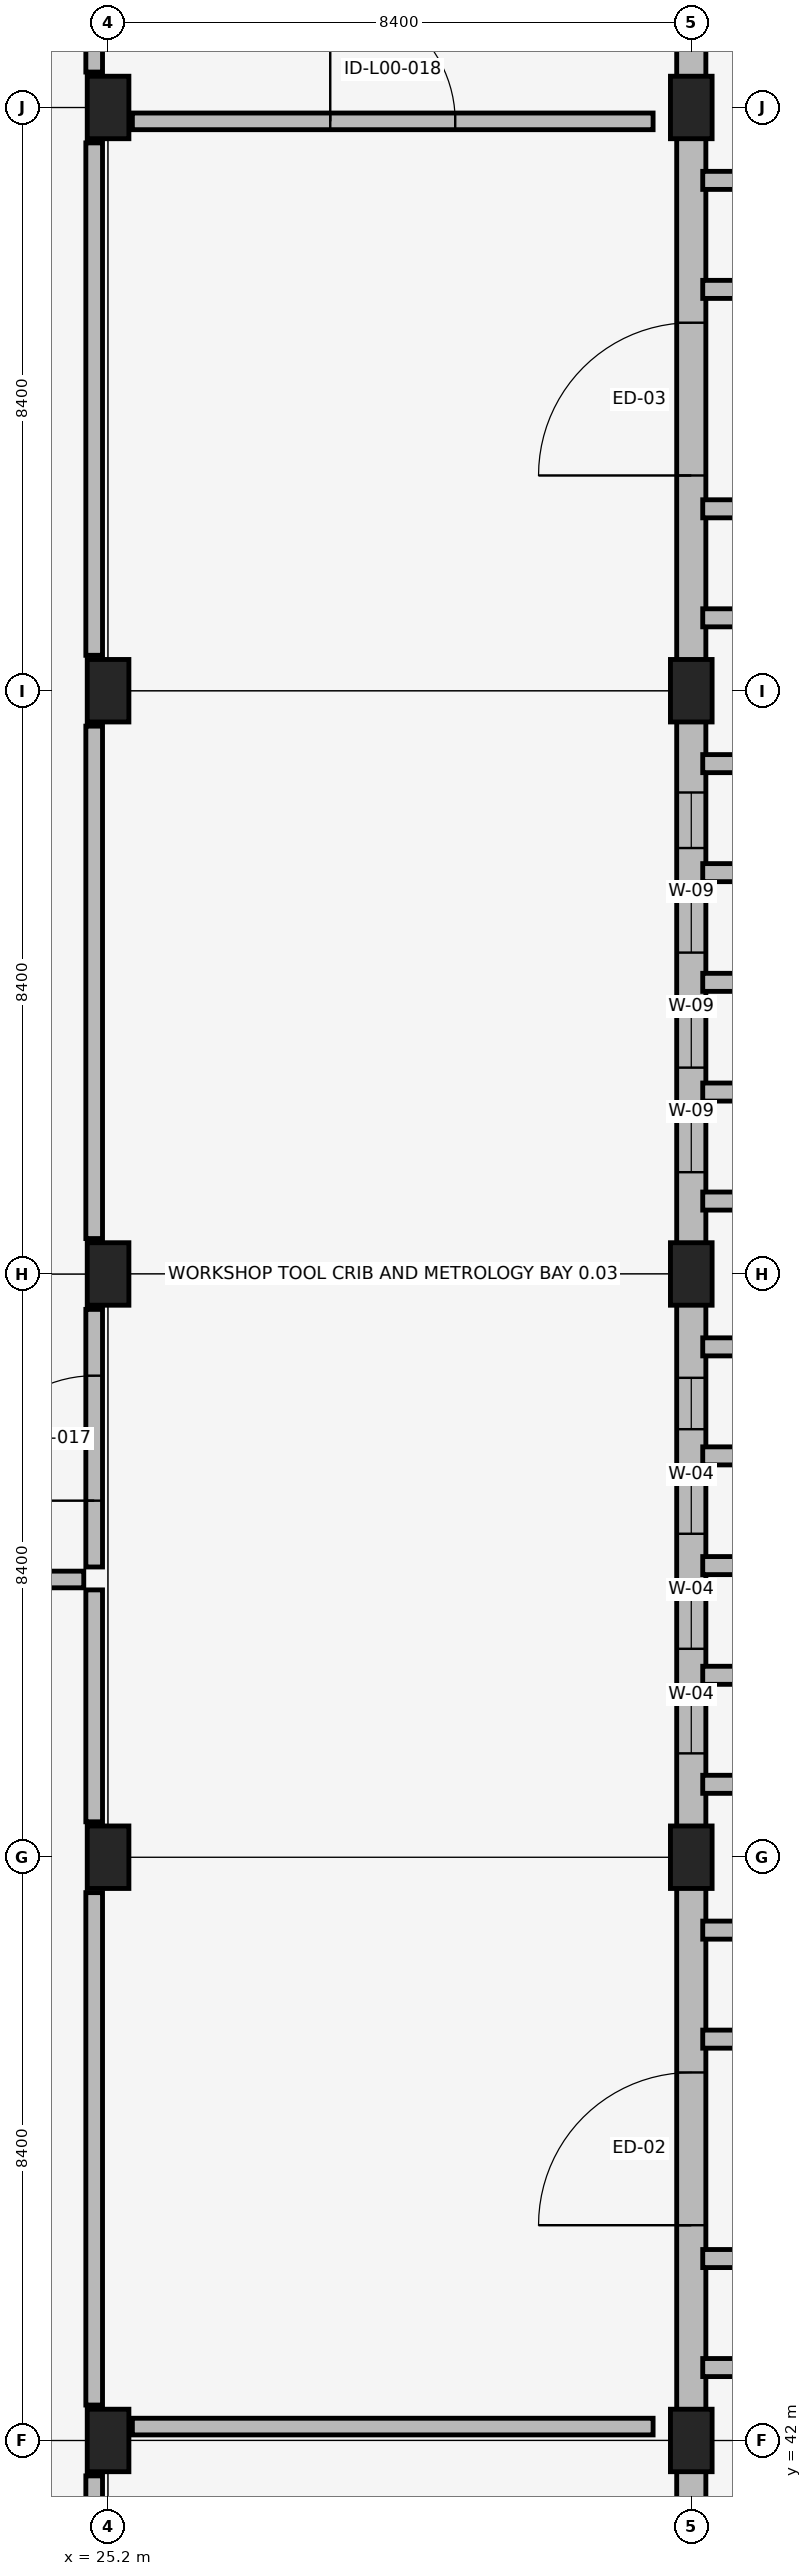
"""IFC4 building model, lengths in metres.
Left out: names, types, materials, properties, quantities, classifications, styles, units other than length and angle.
Written with IfcOpenShell. Run it as: python <this file> out.ifc"""

import sys

from ifc_helpers import new_model, si_unit, direction, frame, frame_2d, origin, origin_2d, place, context, subcontext, project, spatial, rectangle, extrude, element, fill, save


model = new_model("IFC4")
c1 = context("Model", 3, precision=1e-05, world=origin(), true_north=direction((0.0, 1.0)))
c2 = subcontext(c1, "Body", "Model", "MODEL_VIEW")
j1 = project(units=[si_unit("LENGTHUNIT", "METRE"), si_unit("PLANEANGLEUNIT", "RADIAN")], contexts=[c1])
p1 = place(None, origin())
s1 = spatial("IfcSite", under=j1, at=p1, CompositionType="ELEMENT")
p2 = place(p1, origin())
s2 = spatial("IfcBuilding", under=s1, at=p2, CompositionType="ELEMENT")
p3 = place(p2, origin())
s3 = spatial("IfcBuildingStorey", under=s2, at=p3, CompositionType="ELEMENT", Elevation=0.0)
for number, where, z_axis, x_axis in (
    (1, (25.2, 42.0, 0.0), (0.0, 0.0, 1.0), (1.0, 0.0, 0.0)),
    (2, (25.2, 50.4, 0.0), (0.0, 0.0, 1.0), (1.0, 0.0, 0.0)),
    (3, (25.2, 58.8, 0.0), (0.0, 0.0, 1.0), (1.0, 0.0, 0.0)),
    (4, (25.2, 67.2, 0.0), (0.0, 0.0, 1.0), (1.0, 0.0, 0.0)),
    (5, (25.2, 75.6, 0.0), (0.0, 0.0, 1.0), (1.0, 0.0, 0.0)),
    (6, (33.6, 42.0, 0.0), (0.0, 0.0, 1.0), (1.0, 0.0, 0.0)),
    (7, (33.6, 50.4, 0.0), (0.0, 0.0, 1.0), (1.0, 0.0, 0.0)),
    (8, (33.6, 58.8, 0.0), (0.0, 0.0, 1.0), (1.0, 0.0, 0.0)),
    (9, (33.6, 67.2, 0.0), (0.0, 0.0, 1.0), (1.0, 0.0, 0.0)),
    (10, (33.6, 75.6, 0.0), (0.0, 0.0, 1.0), (1.0, 0.0, 0.0)),
):
    element("IfcColumn", number, at=place(p3, frame(where, z_axis=z_axis, x_axis=x_axis)), inside=s3, PredefinedType="COLUMN", context=c2, shape_type="SweptSolid", body=[
        extrude(rectangle(XDim=0.6, YDim=0.9, at=origin_2d()), origin(), (0.0, 0.0, 1.0), 5.14),
    ])
p4 = place(p3, frame((33.6, 34.035, 0.0), z_axis=(0.0, 0.0, 1.0), x_axis=(0.0, 1.0, 0.0)))
e11 = element("IfcWall", 11, at=p4, inside=s3, PredefinedType="SOLIDWALL", context=c2, shape_type="SweptSolid", body=[
    extrude(rectangle(XDim=7.53, YDim=0.42, at=frame_2d((3.765, 0.0))), origin(), (0.0, 0.0, 1.0), 4.35),
])
p5 = place(p3, frame((33.6, 42.435, 0.0), z_axis=(0.0, 0.0, 1.0), x_axis=(0.0, 1.0, 0.0)))
e12 = element("IfcWall", 12, at=p5, inside=s3, PredefinedType="SOLIDWALL", context=c2, shape_type="SweptSolid", body=[
    extrude(rectangle(XDim=7.53, YDim=0.42, at=frame_2d((3.765, 0.0))), origin(), (0.0, 0.0, 1.0), 4.35),
])
p6 = place(p5, frame((2.665, 0.0, 0.0)))
e13 = element("IfcOpeningElement", 13, at=p6, cuts=e12, PredefinedType="OPENING", context=c2, shape_type="SweptSolid", body=[
    extrude(rectangle(XDim=2.2, YDim=2.4, at=frame_2d((1.1, 1.2))), frame((0.0, 0.22, 0.0), z_axis=(0.0, -1.0, 0.0), x_axis=(1.0, 0.0, 0.0)), (0.0, 0.0, 1.0), 0.44),
])
for number, where, z_axis, x_axis in (
    (14, (33.765, 43.05, -0.25), (0.0, 0.0, 1.0), (1.0, 0.0, 0.0)),
    (15, (33.765, 44.62, -0.25), (0.0, 0.0, 1.0), (1.0, 0.0, 0.0)),
    (16, (33.765, 47.78, -0.25), (0.0, 0.0, 1.0), (1.0, 0.0, 0.0)),
    (17, (33.765, 49.35, -0.25), (0.0, 0.0, 1.0), (1.0, 0.0, 0.0)),
):
    element("IfcWall", number, at=place(p3, frame(where, z_axis=z_axis, x_axis=x_axis)), inside=s3, PredefinedType="SOLIDWALL", context=c2, shape_type="SweptSolid", body=[
        extrude(rectangle(XDim=0.7, YDim=0.26, at=frame_2d((0.35, 0.0))), origin(), (0.0, 0.0, 1.0), 5.69),
    ])
p7 = place(p3, frame((33.6, 50.835, 0.0), z_axis=(0.0, 0.0, 1.0), x_axis=(0.0, 1.0, 0.0)))
e18 = element("IfcWall", 18, at=p7, inside=s3, PredefinedType="SOLIDWALL", context=c2, shape_type="SweptSolid", body=[
    extrude(rectangle(XDim=7.53, YDim=0.42, at=frame_2d((3.765, 0.0))), origin(), (0.0, 0.0, 1.0), 4.35),
])
p8 = place(p7, frame((1.061, 0.0, 0.75)))
e19 = element("IfcOpeningElement", 19, at=p8, cuts=e18, PredefinedType="OPENING", context=c2, shape_type="SweptSolid", body=[
    extrude(rectangle(XDim=0.74, YDim=2.3, at=frame_2d((0.37, 1.15))), frame((0.0, 0.22, 0.0), z_axis=(0.0, -1.0, 0.0), x_axis=(1.0, 0.0, 0.0)), (0.0, 0.0, 1.0), 0.44),
])
p9 = place(p7, frame((2.567, 0.0, 0.75)))
e20 = element("IfcOpeningElement", 20, at=p9, cuts=e18, PredefinedType="OPENING", context=c2, shape_type="SweptSolid", body=[
    extrude(rectangle(XDim=0.74, YDim=2.3, at=frame_2d((0.37, 1.15))), frame((0.0, 0.22, 0.0), z_axis=(0.0, -1.0, 0.0), x_axis=(1.0, 0.0, 0.0)), (0.0, 0.0, 1.0), 0.44),
])
p10 = place(p7, frame((4.223, 0.0, 0.75)))
e21 = element("IfcOpeningElement", 21, at=p10, cuts=e18, PredefinedType="OPENING", context=c2, shape_type="SweptSolid", body=[
    extrude(rectangle(XDim=0.74, YDim=2.3, at=frame_2d((0.37, 1.15))), frame((0.0, 0.22, 0.0), z_axis=(0.0, -1.0, 0.0), x_axis=(1.0, 0.0, 0.0)), (0.0, 0.0, 1.0), 0.44),
])
p11 = place(p7, frame((5.729, 0.0, 0.75)))
e22 = element("IfcOpeningElement", 22, at=p11, cuts=e18, PredefinedType="OPENING", context=c2, shape_type="SweptSolid", body=[
    extrude(rectangle(XDim=0.74, YDim=2.3, at=frame_2d((0.37, 1.15))), frame((0.0, 0.22, 0.0), z_axis=(0.0, -1.0, 0.0), x_axis=(1.0, 0.0, 0.0)), (0.0, 0.0, 1.0), 0.44),
])
for number, where, z_axis, x_axis in (
    (23, (33.765, 51.45, -0.25), (0.0, 0.0, 1.0), (1.0, 0.0, 0.0)),
    (24, (33.765, 53.02, -0.25), (0.0, 0.0, 1.0), (1.0, 0.0, 0.0)),
    (25, (33.765, 54.6, -0.25), (0.0, 0.0, 1.0), (1.0, 0.0, 0.0)),
    (26, (33.765, 56.18, -0.25), (0.0, 0.0, 1.0), (1.0, 0.0, 0.0)),
    (27, (33.765, 57.75, -0.25), (0.0, 0.0, 1.0), (1.0, 0.0, 0.0)),
):
    element("IfcWall", number, at=place(p3, frame(where, z_axis=z_axis, x_axis=x_axis)), inside=s3, PredefinedType="SOLIDWALL", context=c2, shape_type="SweptSolid", body=[
        extrude(rectangle(XDim=0.7, YDim=0.26, at=frame_2d((0.35, 0.0))), origin(), (0.0, 0.0, 1.0), 5.69),
    ])
p12 = place(p3, frame((33.6, 59.235, 0.0), z_axis=(0.0, 0.0, 1.0), x_axis=(0.0, 1.0, 0.0)))
e28 = element("IfcWall", 28, at=p12, inside=s3, PredefinedType="SOLIDWALL", context=c2, shape_type="SweptSolid", body=[
    extrude(rectangle(XDim=7.53, YDim=0.42, at=frame_2d((3.765, 0.0))), origin(), (0.0, 0.0, 1.0), 4.35),
])
p13 = place(p12, frame((1.031, 0.0, 0.75)))
e29 = element("IfcOpeningElement", 29, at=p13, cuts=e28, PredefinedType="OPENING", context=c2, shape_type="SweptSolid", body=[
    extrude(rectangle(XDim=0.8, YDim=2.75, at=frame_2d((0.4, 1.375))), frame((0.0, 0.22, 0.0), z_axis=(0.0, -1.0, 0.0), x_axis=(1.0, 0.0, 0.0)), (0.0, 0.0, 1.0), 0.44),
])
p14 = place(p12, frame((2.537, 0.0, 0.75)))
e30 = element("IfcOpeningElement", 30, at=p14, cuts=e28, PredefinedType="OPENING", context=c2, shape_type="SweptSolid", body=[
    extrude(rectangle(XDim=0.8, YDim=2.75, at=frame_2d((0.4, 1.375))), frame((0.0, 0.22, 0.0), z_axis=(0.0, -1.0, 0.0), x_axis=(1.0, 0.0, 0.0)), (0.0, 0.0, 1.0), 0.44),
])
p15 = place(p12, frame((4.193, 0.0, 0.75)))
e31 = element("IfcOpeningElement", 31, at=p15, cuts=e28, PredefinedType="OPENING", context=c2, shape_type="SweptSolid", body=[
    extrude(rectangle(XDim=0.8, YDim=2.75, at=frame_2d((0.4, 1.375))), frame((0.0, 0.22, 0.0), z_axis=(0.0, -1.0, 0.0), x_axis=(1.0, 0.0, 0.0)), (0.0, 0.0, 1.0), 0.44),
])
p16 = place(p12, frame((5.699, 0.0, 0.75)))
e32 = element("IfcOpeningElement", 32, at=p16, cuts=e28, PredefinedType="OPENING", context=c2, shape_type="SweptSolid", body=[
    extrude(rectangle(XDim=0.8, YDim=2.75, at=frame_2d((0.4, 1.375))), frame((0.0, 0.22, 0.0), z_axis=(0.0, -1.0, 0.0), x_axis=(1.0, 0.0, 0.0)), (0.0, 0.0, 1.0), 0.44),
])
for number, where, z_axis, x_axis in (
    (33, (33.765, 59.85, -0.25), (0.0, 0.0, 1.0), (1.0, 0.0, 0.0)),
    (34, (33.765, 61.42, -0.25), (0.0, 0.0, 1.0), (1.0, 0.0, 0.0)),
    (35, (33.765, 63.0, -0.25), (0.0, 0.0, 1.0), (1.0, 0.0, 0.0)),
    (36, (33.765, 64.58, -0.25), (0.0, 0.0, 1.0), (1.0, 0.0, 0.0)),
    (37, (33.765, 66.15, -0.25), (0.0, 0.0, 1.0), (1.0, 0.0, 0.0)),
):
    element("IfcWall", number, at=place(p3, frame(where, z_axis=z_axis, x_axis=x_axis)), inside=s3, PredefinedType="SOLIDWALL", context=c2, shape_type="SweptSolid", body=[
        extrude(rectangle(XDim=0.7, YDim=0.26, at=frame_2d((0.35, 0.0))), origin(), (0.0, 0.0, 1.0), 5.69),
    ])
p17 = place(p3, frame((33.6, 67.635, 0.0), z_axis=(0.0, 0.0, 1.0), x_axis=(0.0, 1.0, 0.0)))
e38 = element("IfcWall", 38, at=p17, inside=s3, PredefinedType="SOLIDWALL", context=c2, shape_type="SweptSolid", body=[
    extrude(rectangle(XDim=7.53, YDim=0.42, at=frame_2d((3.765, 0.0))), origin(), (0.0, 0.0, 1.0), 4.35),
])
p18 = place(p17, frame((2.665, 0.0, 0.0)))
e39 = element("IfcOpeningElement", 39, at=p18, cuts=e38, PredefinedType="OPENING", context=c2, shape_type="SweptSolid", body=[
    extrude(rectangle(XDim=2.2, YDim=2.4, at=frame_2d((1.1, 1.2))), frame((0.0, 0.22, 0.0), z_axis=(0.0, -1.0, 0.0), x_axis=(1.0, 0.0, 0.0)), (0.0, 0.0, 1.0), 0.44),
])
for number, where, z_axis, x_axis in (
    (40, (33.765, 68.25, -0.25), (0.0, 0.0, 1.0), (1.0, 0.0, 0.0)),
    (41, (33.765, 69.82, -0.25), (0.0, 0.0, 1.0), (1.0, 0.0, 0.0)),
    (42, (33.765, 72.98, -0.25), (0.0, 0.0, 1.0), (1.0, 0.0, 0.0)),
    (43, (33.765, 74.55, -0.25), (0.0, 0.0, 1.0), (1.0, 0.0, 0.0)),
):
    element("IfcWall", number, at=place(p3, frame(where, z_axis=z_axis, x_axis=x_axis)), inside=s3, PredefinedType="SOLIDWALL", context=c2, shape_type="SweptSolid", body=[
        extrude(rectangle(XDim=0.7, YDim=0.26, at=frame_2d((0.35, 0.0))), origin(), (0.0, 0.0, 1.0), 5.69),
    ])
p19 = place(p3, frame((33.6, 76.035, 0.0), z_axis=(0.0, 0.0, 1.0), x_axis=(0.0, 1.0, 0.0)))
e44 = element("IfcWall", 44, at=p19, inside=s3, PredefinedType="SOLIDWALL", context=c2, shape_type="SweptSolid", body=[
    extrude(rectangle(XDim=7.53, YDim=0.42, at=frame_2d((3.765, 0.0))), origin(), (0.0, 0.0, 1.0), 4.35),
])
p20 = place(p3, frame((0.55, 54.4, 0.0), z_axis=(0.0, 0.0, 1.0), x_axis=(1.0, 0.0, 0.0)))
e45 = element("IfcWall", 45, at=p20, inside=s3, PredefinedType="PARTITIONING", context=c2, shape_type="SweptSolid", body=[
    extrude(rectangle(XDim=24.3, YDim=0.24, at=frame_2d((12.15, 0.0))), origin(), (0.0, 0.0, 1.0), 5.14),
])
for number, where, z_axis, x_axis in (
    (46, (25.0, 34.11, 0.0), (0.0, 0.0, 1.0), (0.0, 1.0, 0.0)),
    (47, (25.0, 42.51, 0.0), (0.0, 0.0, 1.0), (0.0, 1.0, 0.0)),
):
    element("IfcWall", number, at=place(p3, frame(where, z_axis=z_axis, x_axis=x_axis)), inside=s3, PredefinedType="PARTITIONING", context=c2, shape_type="SweptSolid", body=[
        extrude(rectangle(XDim=7.38, YDim=0.24, at=frame_2d((3.69, 0.0))), origin(), (0.0, 0.0, 1.0), 4.35),
    ])
p21 = place(p3, frame((25.0, 50.91, 0.0), z_axis=(0.0, 0.0, 1.0), x_axis=(0.0, 1.0, 0.0)))
e48 = element("IfcWall", 48, at=p21, inside=s3, PredefinedType="PARTITIONING", context=c2, shape_type="SweptSolid", body=[
    extrude(rectangle(XDim=3.34, YDim=0.24, at=frame_2d((1.67, 0.0))), origin(), (0.0, 0.0, 1.0), 4.35),
])
p22 = place(p3, frame((25.0, 54.58, 0.0), z_axis=(0.0, 0.0, 1.0), x_axis=(0.0, 1.0, 0.0)))
e49 = element("IfcWall", 49, at=p22, inside=s3, PredefinedType="PARTITIONING", context=c2, shape_type="SweptSolid", body=[
    extrude(rectangle(XDim=3.71, YDim=0.24, at=frame_2d((1.855, 0.0))), origin(), (0.0, 0.0, 1.0), 4.35),
])
p23 = place(p22, frame((0.955, 0.0, 0.0)))
e50 = element("IfcOpeningElement", 50, at=p23, cuts=e49, PredefinedType="OPENING", context=c2, shape_type="SweptSolid", body=[
    extrude(rectangle(XDim=1.8, YDim=2.4, at=frame_2d((0.9, 1.2))), frame((0.0, 0.13, 0.0), z_axis=(0.0, -1.0, 0.0), x_axis=(1.0, 0.0, 0.0)), (0.0, 0.0, 1.0), 0.26),
])
p24 = place(p3, frame((25.0, 59.31, 0.0), z_axis=(0.0, 0.0, 1.0), x_axis=(0.0, 1.0, 0.0)))
e51 = element("IfcWall", 51, at=p24, inside=s3, PredefinedType="PARTITIONING", context=c2, shape_type="SweptSolid", body=[
    extrude(rectangle(XDim=7.38, YDim=0.24, at=frame_2d((3.69, 0.0))), origin(), (0.0, 0.0, 1.0), 4.35),
])
p25 = place(p3, frame((25.0, 67.71, 0.0), z_axis=(0.0, 0.0, 1.0), x_axis=(0.0, 1.0, 0.0)))
e52 = element("IfcWall", 52, at=p25, inside=s3, PredefinedType="PARTITIONING", context=c2, shape_type="SweptSolid", body=[
    extrude(rectangle(XDim=7.38, YDim=0.24, at=frame_2d((3.69, 0.0))), origin(), (0.0, 0.0, 1.0), 4.35),
])
p26 = place(p3, frame((25.0, 76.11, 0.0), z_axis=(0.0, 0.0, 1.0), x_axis=(0.0, 1.0, 0.0)))
e53 = element("IfcWall", 53, at=p26, inside=s3, PredefinedType="PARTITIONING", context=c2, shape_type="SweptSolid", body=[
    extrude(rectangle(XDim=7.54, YDim=0.24, at=frame_2d((3.77, 0.0))), origin(), (0.0, 0.0, 1.0), 4.35),
])
p27 = place(p3, frame((25.55, 75.4, 0.0), z_axis=(0.0, 0.0, 1.0), x_axis=(1.0, 0.0, 0.0)))
e54 = element("IfcWall", 54, at=p27, inside=s3, PredefinedType="PARTITIONING", context=c2, shape_type="SweptSolid", body=[
    extrude(rectangle(XDim=7.5, YDim=0.24, at=frame_2d((3.75, 0.0))), origin(), (0.0, 0.0, 1.0), 4.42),
])
p28 = place(p27, frame((2.85, 0.0, 0.0)))
e55 = element("IfcOpeningElement", 55, at=p28, cuts=e54, PredefinedType="OPENING", context=c2, shape_type="SweptSolid", body=[
    extrude(rectangle(XDim=1.8, YDim=2.4, at=frame_2d((0.9, 1.2))), frame((0.0, 0.13, 0.0), z_axis=(0.0, -1.0, 0.0), x_axis=(1.0, 0.0, 0.0)), (0.0, 0.0, 1.0), 0.26),
])
p29 = place(p3, frame((25.55, 42.2, 0.0), z_axis=(0.0, 0.0, 1.0), x_axis=(1.0, 0.0, 0.0)))
e56 = element("IfcWall", 56, at=p29, inside=s3, PredefinedType="PARTITIONING", context=c2, shape_type="SweptSolid", body=[
    extrude(rectangle(XDim=7.5, YDim=0.24, at=frame_2d((3.75, 0.0))), origin(), (0.0, 0.0, 1.0), 4.42),
])
p30 = place(p6, origin())
e57 = element("IfcDoor", 57, at=p30, inside=s3, OperationType="DOUBLE_DOOR_SINGLE_SWING", PredefinedType="DOOR", context=c2, shape_type="SweptSolid", body=[
    extrude(rectangle(XDim=2.2, YDim=2.4, at=frame_2d((1.1, 1.2))), frame((0.0, 0.025, 0.0), z_axis=(0.0, -1.0, 0.0), x_axis=(1.0, 0.0, 0.0)), (0.0, 0.0, 1.0), 0.05),
])
fill(e13, e57)
p31 = place(p8, origin())
e58 = element("IfcWindow", 58, at=p31, inside=s3, PartitioningType="DOUBLE_PANEL_VERTICAL", PredefinedType="WINDOW", context=c2, shape_type="SweptSolid", body=[
    extrude(rectangle(XDim=0.74, YDim=2.3, at=frame_2d((0.37, 1.15))), frame((0.0, 0.03, 0.0), z_axis=(0.0, -1.0, 0.0), x_axis=(1.0, 0.0, 0.0)), (0.0, 0.0, 1.0), 0.06),
])
fill(e19, e58)
p32 = place(p9, origin())
e59 = element("IfcWindow", 59, at=p32, inside=s3, PartitioningType="DOUBLE_PANEL_VERTICAL", PredefinedType="WINDOW", context=c2, shape_type="SweptSolid", body=[
    extrude(rectangle(XDim=0.74, YDim=2.3, at=frame_2d((0.37, 1.15))), frame((0.0, 0.03, 0.0), z_axis=(0.0, -1.0, 0.0), x_axis=(1.0, 0.0, 0.0)), (0.0, 0.0, 1.0), 0.06),
])
fill(e20, e59)
p33 = place(p10, origin())
e60 = element("IfcWindow", 60, at=p33, inside=s3, PartitioningType="DOUBLE_PANEL_VERTICAL", PredefinedType="WINDOW", context=c2, shape_type="SweptSolid", body=[
    extrude(rectangle(XDim=0.74, YDim=2.3, at=frame_2d((0.37, 1.15))), frame((0.0, 0.03, 0.0), z_axis=(0.0, -1.0, 0.0), x_axis=(1.0, 0.0, 0.0)), (0.0, 0.0, 1.0), 0.06),
])
fill(e21, e60)
p34 = place(p11, origin())
e61 = element("IfcWindow", 61, at=p34, inside=s3, PartitioningType="DOUBLE_PANEL_VERTICAL", PredefinedType="WINDOW", context=c2, shape_type="SweptSolid", body=[
    extrude(rectangle(XDim=0.74, YDim=2.3, at=frame_2d((0.37, 1.15))), frame((0.0, 0.03, 0.0), z_axis=(0.0, -1.0, 0.0), x_axis=(1.0, 0.0, 0.0)), (0.0, 0.0, 1.0), 0.06),
])
fill(e22, e61)
p35 = place(p13, origin())
e62 = element("IfcWindow", 62, at=p35, inside=s3, PartitioningType="DOUBLE_PANEL_VERTICAL", PredefinedType="WINDOW", context=c2, shape_type="SweptSolid", body=[
    extrude(rectangle(XDim=0.8, YDim=2.75, at=frame_2d((0.4, 1.375))), frame((0.0, 0.03, 0.0), z_axis=(0.0, -1.0, 0.0), x_axis=(1.0, 0.0, 0.0)), (0.0, 0.0, 1.0), 0.06),
])
fill(e29, e62)
p36 = place(p14, origin())
e63 = element("IfcWindow", 63, at=p36, inside=s3, PartitioningType="DOUBLE_PANEL_VERTICAL", PredefinedType="WINDOW", context=c2, shape_type="SweptSolid", body=[
    extrude(rectangle(XDim=0.8, YDim=2.75, at=frame_2d((0.4, 1.375))), frame((0.0, 0.03, 0.0), z_axis=(0.0, -1.0, 0.0), x_axis=(1.0, 0.0, 0.0)), (0.0, 0.0, 1.0), 0.06),
])
fill(e30, e63)
p37 = place(p15, origin())
e64 = element("IfcWindow", 64, at=p37, inside=s3, PartitioningType="DOUBLE_PANEL_VERTICAL", PredefinedType="WINDOW", context=c2, shape_type="SweptSolid", body=[
    extrude(rectangle(XDim=0.8, YDim=2.75, at=frame_2d((0.4, 1.375))), frame((0.0, 0.03, 0.0), z_axis=(0.0, -1.0, 0.0), x_axis=(1.0, 0.0, 0.0)), (0.0, 0.0, 1.0), 0.06),
])
fill(e31, e64)
p38 = place(p16, origin())
e65 = element("IfcWindow", 65, at=p38, inside=s3, PartitioningType="DOUBLE_PANEL_VERTICAL", PredefinedType="WINDOW", context=c2, shape_type="SweptSolid", body=[
    extrude(rectangle(XDim=0.8, YDim=2.75, at=frame_2d((0.4, 1.375))), frame((0.0, 0.03, 0.0), z_axis=(0.0, -1.0, 0.0), x_axis=(1.0, 0.0, 0.0)), (0.0, 0.0, 1.0), 0.06),
])
fill(e32, e65)
p39 = place(p18, origin())
e66 = element("IfcDoor", 66, at=p39, inside=s3, OperationType="DOUBLE_DOOR_SINGLE_SWING", PredefinedType="DOOR", context=c2, shape_type="SweptSolid", body=[
    extrude(rectangle(XDim=2.2, YDim=2.4, at=frame_2d((1.1, 1.2))), frame((0.0, 0.025, 0.0), z_axis=(0.0, -1.0, 0.0), x_axis=(1.0, 0.0, 0.0)), (0.0, 0.0, 1.0), 0.05),
])
fill(e39, e66)
p40 = place(p23, origin())
e67 = element("IfcDoor", 67, at=p40, inside=s3, OperationType="DOUBLE_DOOR_SINGLE_SWING", PredefinedType="DOOR", context=c2, shape_type="SweptSolid", body=[
    extrude(rectangle(XDim=1.8, YDim=2.4, at=frame_2d((0.9, 1.2))), frame((0.0, 0.025, 0.0), z_axis=(0.0, -1.0, 0.0), x_axis=(1.0, 0.0, 0.0)), (0.0, 0.0, 1.0), 0.05),
])
fill(e50, e67)
p41 = place(p28, origin())
e68 = element("IfcDoor", 68, at=p41, inside=s3, OperationType="DOUBLE_DOOR_SINGLE_SWING", PredefinedType="DOOR", context=c2, shape_type="SweptSolid", body=[
    extrude(rectangle(XDim=1.8, YDim=2.4, at=frame_2d((0.9, 1.2))), frame((0.0, 0.025, 0.0), z_axis=(0.0, -1.0, 0.0), x_axis=(1.0, 0.0, 0.0)), (0.0, 0.0, 1.0), 0.05),
])
fill(e55, e68)
save(model, sys.argv[1])
